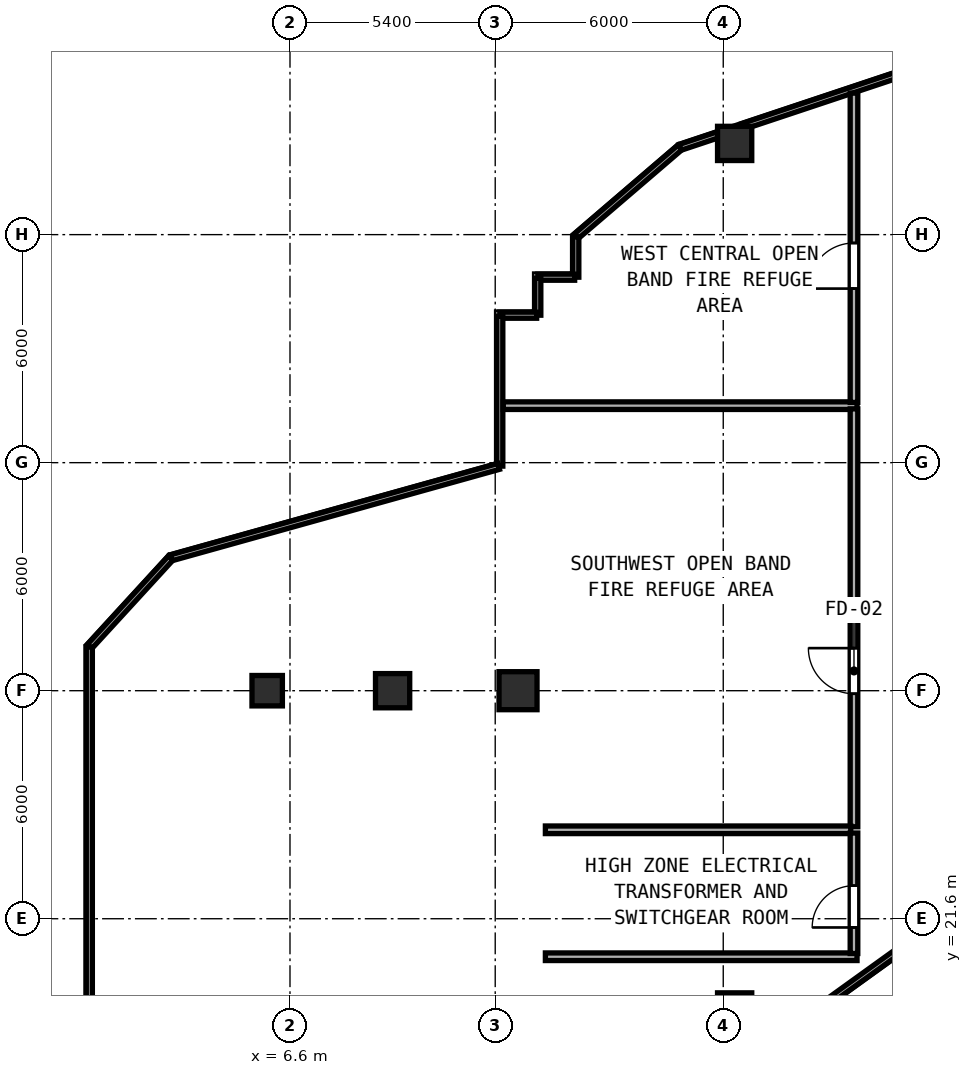
"""IFC4 building model, lengths in metres.
Left out: names, types, materials, properties, quantities, classifications, styles, units other than length and angle.
Written with IfcOpenShell. Run it as: python <this file> out.ifc"""

import sys

from ifc_helpers import new_model, si_unit, direction, frame, frame_2d, origin, origin_2d, place, context, subcontext, project, spatial, rectangle, hollow_rectangle, extrude, element, fill, save


model = new_model("IFC4")
c1 = context("Model", 3, precision=1e-05, world=origin(), true_north=direction((0.0, 1.0)))
c2 = subcontext(c1, "Body", "Model", "MODEL_VIEW")
j1 = project(units=[si_unit("LENGTHUNIT", "METRE"), si_unit("PLANEANGLEUNIT", "RADIAN")], contexts=[c1])
p1 = place(None, origin())
s1 = spatial("IfcSite", under=j1, at=p1, CompositionType="ELEMENT")
p2 = place(p1, origin())
s2 = spatial("IfcBuilding", under=s1, at=p2, CompositionType="ELEMENT")
p3 = place(p2, frame((0.0, 0.0, 136.4)))
s3 = spatial("IfcBuildingStorey", under=s2, at=p3, CompositionType="ELEMENT", Elevation=136.4)
p4 = place(p3, frame((12.6, 27.6, 0.0), z_axis=(0.0, 0.0, 1.0), x_axis=(1.0, 0.0, 0.0)))
e1 = element("IfcColumn", 1, at=p4, inside=s3, PredefinedType="COLUMN", context=c2, shape_type="SweptSolid", body=[
    extrude(hollow_rectangle(XDim=1.0, YDim=1.0, WallThickness=0.038, at=origin_2d()), origin(), (0.0, 0.0, 1.0), 4.6),
])
p5 = place(p3, frame((6.0, 27.6, 0.0), z_axis=(0.0, 0.0, 1.0), x_axis=(1.0, 0.0, 0.0)))
e2 = element("IfcColumn", 2, at=p5, inside=s3, PredefinedType="COLUMN", context=c2, shape_type="SweptSolid", body=[
    extrude(hollow_rectangle(XDim=0.8, YDim=0.8, WallThickness=0.03, at=origin_2d()), origin(), (0.0, 0.0, 1.0), 4.6),
])
for number, where, z_axis, x_axis in (
    (3, (18.3, 19.2, 0.0), (0.0, 0.0, 1.0), (1.0, 0.0, 0.0)),
    (4, (18.3, 42.0, 0.0), (0.0, 0.0, 1.0), (1.0, 0.0, 0.0)),
    (5, (9.3, 27.6, 0.0), (0.0, 0.0, 1.0), (1.0, 0.0, 0.0)),
):
    element("IfcColumn", number, at=place(p3, frame(where, z_axis=z_axis, x_axis=x_axis)), inside=s3, PredefinedType="COLUMN", context=c2, shape_type="SweptSolid", body=[
        extrude(hollow_rectangle(XDim=0.9, YDim=0.9, WallThickness=0.034, at=origin_2d()), origin(), (0.0, 0.0, 1.0), 4.6),
    ])
p6 = place(p3, frame((14.193, 14.687, 0.0), z_axis=(0.0, 0.0, 1.0), x_axis=(0.811543217016, 0.584292398475, 0.0)))
e6 = element("IfcWall", 6, at=p6, inside=s3, PredefinedType="PARAPET", context=c2, shape_type="SweptSolid", body=[
    extrude(rectangle(XDim=11.478, YDim=0.16, at=frame_2d((5.739, 0.0))), origin(), (0.0, 0.0, 1.0), 1.15),
])
p7 = place(p3, frame((24.092, 44.304, 0.0), z_axis=(0.0, 0.0, 1.0), x_axis=(-0.948683298051, -0.316227766017, 0.0)))
e7 = element("IfcWall", 7, at=p7, inside=s3, PredefinedType="PARAPET", context=c2, shape_type="SweptSolid", body=[
    extrude(rectangle(XDim=5.888, YDim=0.16, at=frame_2d((2.944, 0.0))), origin(), (0.0, 0.0, 1.0), 1.15),
])
p8 = place(p3, frame((17.858, 42.226, 0.0), z_axis=(0.0, 0.0, 1.0), x_axis=(-0.948636865667, -0.316367029093, 0.0)))
e8 = element("IfcWall", 8, at=p8, inside=s3, PredefinedType="PARAPET", context=c2, shape_type="SweptSolid", body=[
    extrude(rectangle(XDim=1.052, YDim=0.16, at=frame_2d((0.526, 0.0))), origin(), (0.0, 0.0, 1.0), 1.15),
])
p9 = place(p3, frame((16.86, 41.894, 0.0), z_axis=(0.0, 0.0, 1.0), x_axis=(-0.759247051556, -0.650802515902, 0.0)))
e9 = element("IfcWall", 9, at=p9, inside=s3, PredefinedType="PARAPET", context=c2, shape_type="SweptSolid", body=[
    extrude(rectangle(XDim=3.609, YDim=0.16, at=frame_2d((1.804, 0.0))), origin(), (0.0, 0.0, 1.0), 1.15),
])
p10 = place(p3, frame((14.12, 39.545, 0.0), z_axis=(0.0, 0.0, 1.0), x_axis=(0.0, -1.0, 0.0)))
e10 = element("IfcWall", 10, at=p10, inside=s3, PredefinedType="PARAPET", context=c2, shape_type="SweptSolid", body=[
    extrude(rectangle(XDim=1.065, YDim=0.16, at=frame_2d((0.532, 0.0))), origin(), (0.0, 0.0, 1.0), 1.15),
])
for number, where, z_axis, x_axis in (
    (11, (14.09, 38.48, 0.0), (0.0, 0.0, 1.0), (-1.0, 0.0, 0.0)),
    (12, (13.12, 38.45, 0.0), (0.0, 0.0, 1.0), (0.0, -1.0, 0.0)),
    (13, (13.09, 37.48, 0.0), (0.0, 0.0, 1.0), (-1.0, 0.0, 0.0)),
):
    element("IfcWall", number, at=place(p3, frame(where, z_axis=z_axis, x_axis=x_axis)), inside=s3, PredefinedType="PARAPET", context=c2, shape_type="SweptSolid", body=[
        extrude(rectangle(XDim=0.97, YDim=0.16, at=frame_2d((0.485, 0.0))), origin(), (0.0, 0.0, 1.0), 1.15),
    ])
p11 = place(p3, frame((12.12, 37.45, 0.0), z_axis=(0.0, 0.0, 1.0), x_axis=(0.0, -1.0, 0.0)))
e14 = element("IfcWall", 14, at=p11, inside=s3, PredefinedType="PARAPET", context=c2, shape_type="SweptSolid", body=[
    extrude(rectangle(XDim=3.941, YDim=0.16, at=frame_2d((1.971, 0.0))), origin(), (0.0, 0.0, 1.0), 1.15),
])
p12 = place(p3, frame((12.091, 33.501, 0.0), z_axis=(0.0, 0.0, 1.0), x_axis=(-0.963194988148, -0.26880367335, 0.0)))
e15 = element("IfcWall", 15, at=p12, inside=s3, PredefinedType="PARAPET", context=c2, shape_type="SweptSolid", body=[
    extrude(rectangle(XDim=8.955, YDim=0.16, at=frame_2d((4.478, 0.0))), origin(), (0.0, 0.0, 1.0), 1.15),
])
p13 = place(p3, frame((3.465, 31.094, 0.0), z_axis=(0.0, 0.0, 1.0), x_axis=(-0.675755969938, -0.737125409339, 0.0)))
e16 = element("IfcWall", 16, at=p13, inside=s3, PredefinedType="PARAPET", context=c2, shape_type="SweptSolid", body=[
    extrude(rectangle(XDim=3.175, YDim=0.16, at=frame_2d((1.587, 0.0))), origin(), (0.0, 0.0, 1.0), 1.15),
])
p14 = place(p3, frame((1.32, 28.753, 0.0), z_axis=(0.0, 0.0, 1.0), x_axis=(0.0, -1.0, 0.0)))
e17 = element("IfcWall", 17, at=p14, inside=s3, PredefinedType="PARAPET", context=c2, shape_type="SweptSolid", body=[
    extrude(rectangle(XDim=20.833, YDim=0.16, at=frame_2d((10.417, 0.0))), origin(), (0.0, 0.0, 1.0), 1.15),
])
p15 = place(p3, frame((12.212, 35.1, 0.0), z_axis=(0.0, 0.0, 1.0), x_axis=(1.0, 0.0, 0.0)))
e18 = element("IfcWall", 18, at=p15, inside=s3, PredefinedType="SOLIDWALL", context=c2, shape_type="SweptSolid", body=[
    extrude(rectangle(XDim=9.308, YDim=0.2, at=frame_2d((4.654, 0.0))), origin(), (0.0, 0.0, 1.0), 4.4),
])
p16 = place(p3, frame((21.44, 24.02, 0.0), z_axis=(0.0, 0.0, 1.0), x_axis=(0.0, 1.0, 0.0)))
e19 = element("IfcWall", 19, at=p16, inside=s3, PredefinedType="SOLIDWALL", context=c2, shape_type="SweptSolid", body=[
    extrude(rectangle(XDim=10.995, YDim=0.2, at=frame_2d((5.498, 0.0))), origin(), (0.0, 0.0, 1.0), 4.4),
])
p17 = place(p16, frame((4.7, 0.0, 0.0), z_axis=(0.0, 0.0, 1.0), x_axis=(-1.0, 0.0, 0.0)))
e20 = element("IfcOpeningElement", 20, at=p17, cuts=e19, PredefinedType="OPENING", context=c2, shape_type="SweptSolid", body=[
    extrude(rectangle(XDim=1.2, YDim=2.15, at=frame_2d((0.6, 1.075))), frame((0.0, 0.11, 0.0), z_axis=(0.0, -1.0, 0.0), x_axis=(1.0, 0.0, 0.0)), (0.0, 0.0, 1.0), 0.22),
])
p18 = place(p3, frame((21.44, 35.185, 0.0), z_axis=(0.0, 0.0, 1.0), x_axis=(0.0, 1.0, 0.0)))
e21 = element("IfcWall", 21, at=p18, inside=s3, PredefinedType="SOLIDWALL", context=c2, shape_type="SweptSolid", body=[
    extrude(rectangle(XDim=8.138, YDim=0.2, at=frame_2d((4.069, 0.0))), origin(), (0.0, 0.0, 1.0), 4.4),
])
p19 = place(p18, frame((4.195, 0.0, 0.0), z_axis=(0.0, 0.0, 1.0), x_axis=(-1.0, 0.0, 0.0)))
e22 = element("IfcOpeningElement", 22, at=p19, cuts=e21, PredefinedType="OPENING", context=c2, shape_type="SweptSolid", body=[
    extrude(rectangle(XDim=1.2, YDim=2.15, at=frame_2d((0.6, 1.075))), frame((0.0, 0.11, 0.0), z_axis=(0.0, -1.0, 0.0), x_axis=(1.0, 0.0, 0.0)), (0.0, 0.0, 1.0), 0.22),
])
p20 = place(p3, frame((13.32, 23.94, 0.0), z_axis=(0.0, 0.0, 1.0), x_axis=(1.0, 0.0, 0.0)))
e23 = element("IfcWall", 23, at=p20, inside=s3, PredefinedType="SOLIDWALL", context=c2, shape_type="SweptSolid", body=[
    extrude(rectangle(XDim=8.035, YDim=0.2, at=frame_2d((4.018, 0.0))), origin(), (0.0, 0.0, 1.0), 4.4),
])
p21 = place(p3, frame((13.32, 20.6, 0.0), z_axis=(0.0, 0.0, 1.0), x_axis=(1.0, 0.0, 0.0)))
e24 = element("IfcWall", 24, at=p21, inside=s3, PredefinedType="SOLIDWALL", context=c2, shape_type="SweptSolid", body=[
    extrude(rectangle(XDim=8.2, YDim=0.2, at=frame_2d((4.1, 0.0))), origin(), (0.0, 0.0, 1.0), 4.4),
])
p22 = place(p3, frame((21.44, 20.685, 0.0), z_axis=(0.0, 0.0, 1.0), x_axis=(0.0, 1.0, 0.0)))
e25 = element("IfcWall", 25, at=p22, inside=s3, PredefinedType="SOLIDWALL", context=c2, shape_type="SweptSolid", body=[
    extrude(rectangle(XDim=3.17, YDim=0.2, at=frame_2d((1.585, 0.0))), origin(), (0.0, 0.0, 1.0), 4.4),
])
p23 = place(p22, frame((1.785, 0.0, 0.0), z_axis=(0.0, 0.0, 1.0), x_axis=(-1.0, 0.0, 0.0)))
e26 = element("IfcOpeningElement", 26, at=p23, cuts=e25, PredefinedType="OPENING", context=c2, shape_type="SweptSolid", body=[
    extrude(rectangle(XDim=1.1, YDim=2.15, at=frame_2d((0.55, 1.075))), frame((0.0, 0.11, 0.0), z_axis=(0.0, -1.0, 0.0), x_axis=(1.0, 0.0, 0.0)), (0.0, 0.0, 1.0), 0.22),
])
p24 = place(p17, origin())
e27 = element("IfcDoor", 27, at=p24, inside=s3, OperationType="SINGLE_SWING_LEFT", PredefinedType="DOOR", context=c2, shape_type="SweptSolid", body=[
    extrude(rectangle(XDim=1.2, YDim=2.15, at=frame_2d((0.6, 1.075))), frame((0.0, 0.025, 0.0), z_axis=(0.0, -1.0, 0.0), x_axis=(1.0, 0.0, 0.0)), (0.0, 0.0, 1.0), 0.05),
])
fill(e20, e27)
p25 = place(p19, origin())
e28 = element("IfcDoor", 28, at=p25, inside=s3, OperationType="SINGLE_SWING_RIGHT", PredefinedType="DOOR", context=c2, shape_type="SweptSolid", body=[
    extrude(rectangle(XDim=1.2, YDim=2.15, at=frame_2d((0.6, 1.075))), frame((0.0, 0.025, 0.0), z_axis=(0.0, -1.0, 0.0), x_axis=(1.0, 0.0, 0.0)), (0.0, 0.0, 1.0), 0.05),
])
fill(e22, e28)
p26 = place(p23, origin())
e29 = element("IfcDoor", 29, at=p26, inside=s3, OperationType="SINGLE_SWING_RIGHT", PredefinedType="DOOR", context=c2, shape_type="SweptSolid", body=[
    extrude(rectangle(XDim=1.1, YDim=2.15, at=frame_2d((0.55, 1.075))), frame((0.0, 0.025, 0.0), z_axis=(0.0, -1.0, 0.0), x_axis=(1.0, 0.0, 0.0)), (0.0, 0.0, 1.0), 0.05),
])
fill(e26, e29)
save(model, sys.argv[1])
